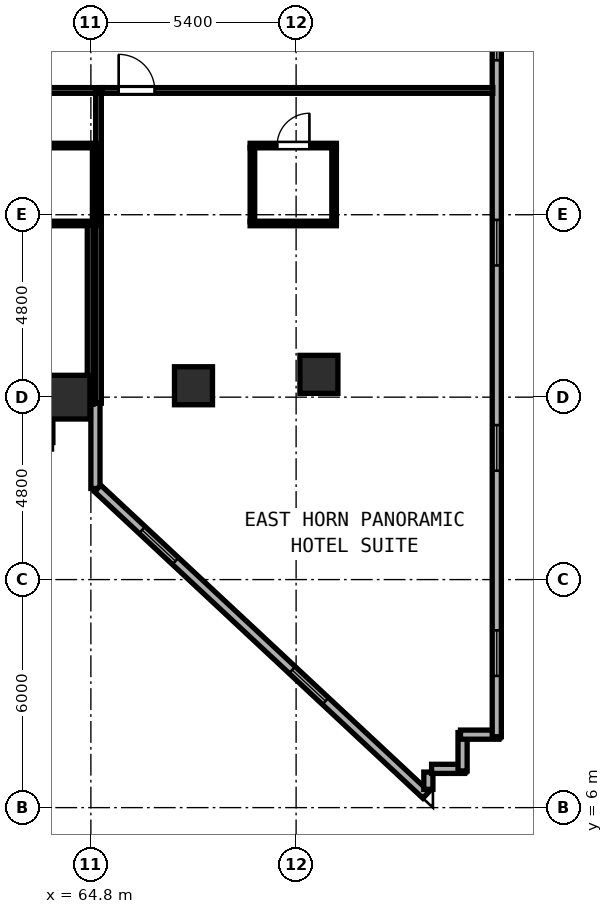
"""IFC4 building model, lengths in metres.
Left out: names, types, materials, properties, quantities, classifications, styles, units other than length and angle.
Written with IfcOpenShell. Run it as: python <this file> out.ifc"""

import sys

from ifc_helpers import new_model, si_unit, direction, frame, frame_2d, origin, origin_2d, place, context, subcontext, project, spatial, rectangle, hollow_rectangle, extrude, element, fill, save


model = new_model("IFC4")
c1 = context("Model", 3, precision=1e-05, world=origin(), true_north=direction((0.0, 1.0)))
c2 = subcontext(c1, "Body", "Model", "MODEL_VIEW")
j1 = project(units=[si_unit("LENGTHUNIT", "METRE"), si_unit("PLANEANGLEUNIT", "RADIAN")], contexts=[c1])
p1 = place(None, origin())
s1 = spatial("IfcSite", under=j1, at=p1, CompositionType="ELEMENT")
p2 = place(p1, origin())
s2 = spatial("IfcBuilding", under=s1, at=p2, CompositionType="ELEMENT")
p3 = place(p2, frame((0.0, 0.0, 70.4)))
s3 = spatial("IfcBuildingStorey", under=s2, at=p3, CompositionType="ELEMENT", Elevation=70.4)
p4 = place(p3, frame((64.2, 16.8, 0.0), z_axis=(0.0, 0.0, 1.0), x_axis=(1.0, 0.0, 0.0)))
e1 = element("IfcColumn", 1, at=p4, inside=s3, PredefinedType="COLUMN", context=c2, shape_type="SweptSolid", body=[
    extrude(hollow_rectangle(XDim=1.15, YDim=1.15, WallThickness=0.042, at=origin_2d()), origin(), (0.0, 0.0, 1.0), 3.8),
])
for number, where, z_axis, x_axis in (
    (2, (70.8, 17.4, 0.0), (0.0, 0.0, 1.0), (1.0, 0.0, 0.0)),
    (3, (67.5, 17.1, 0.0), (0.0, 0.0, 1.0), (1.0, 0.0, 0.0)),
):
    element("IfcColumn", number, at=place(p3, frame(where, z_axis=z_axis, x_axis=x_axis)), inside=s3, PredefinedType="COLUMN", context=c2, shape_type="SweptSolid", body=[
        extrude(hollow_rectangle(XDim=1.0, YDim=1.0, WallThickness=0.038, at=origin_2d()), origin(), (0.0, 0.0, 1.0), 3.8),
    ])
p5 = place(p3, frame((64.92, 16.64, 0.0), z_axis=(0.0, 0.0, 1.0), x_axis=(0.0, -1.0, 0.0)))
e4 = element("IfcWall", 4, at=p5, inside=s3, PredefinedType="SOLIDWALL", context=c2, shape_type="SweptSolid", body=[
    extrude(rectangle(XDim=2.243, YDim=0.24, at=frame_2d((1.121, 0.0))), origin(), (0.0, 0.0, 1.0), 3.6),
])
p6 = place(p3, frame((64.979, 14.397, 0.0), z_axis=(0.0, 0.0, 1.0), x_axis=(0.731053894258, -0.682319722484, 0.0)))
e5 = element("IfcWall", 5, at=p6, inside=s3, PredefinedType="SOLIDWALL", context=c2, shape_type="SweptSolid", body=[
    extrude(rectangle(XDim=11.818, YDim=0.24, at=frame_2d((5.909, 0.0))), origin(), (0.0, 0.0, 1.0), 3.6),
])
p7 = place(p6, frame((1.6, 0.0, 0.85)))
e6 = element("IfcOpeningElement", 6, at=p7, cuts=e5, PredefinedType="OPENING", context=c2, shape_type="SweptSolid", body=[
    extrude(rectangle(XDim=1.2, YDim=1.85, at=frame_2d((0.6, 0.925))), frame((0.0, 0.13, 0.0), z_axis=(0.0, -1.0, 0.0), x_axis=(1.0, 0.0, 0.0)), (0.0, 0.0, 1.0), 0.26),
])
p8 = place(p6, frame((7.0, 0.0, 0.85)))
e7 = element("IfcOpeningElement", 7, at=p8, cuts=e5, PredefinedType="OPENING", context=c2, shape_type="SweptSolid", body=[
    extrude(rectangle(XDim=1.2, YDim=1.85, at=frame_2d((0.6, 0.925))), frame((0.0, 0.13, 0.0), z_axis=(0.0, -1.0, 0.0), x_axis=(1.0, 0.0, 0.0)), (0.0, 0.0, 1.0), 0.26),
])
p9 = place(p3, frame((73.68, 6.481, 0.0), z_axis=(0.0, 0.0, 1.0), x_axis=(0.0, 1.0, 0.0)))
e8 = element("IfcWall", 8, at=p9, inside=s3, PredefinedType="SOLIDWALL", context=c2, shape_type="SweptSolid", body=[
    extrude(rectangle(XDim=0.454, YDim=0.24, at=frame_2d((0.227, 0.0))), origin(), (0.0, 0.0, 1.0), 3.6),
])
p10 = place(p3, frame((73.765, 7.02, 0.0), z_axis=(0.0, 0.0, 1.0), x_axis=(1.0, 0.0, 0.0)))
e9 = element("IfcWall", 9, at=p10, inside=s3, PredefinedType="SOLIDWALL", context=c2, shape_type="SweptSolid", body=[
    extrude(rectangle(XDim=0.87, YDim=0.24, at=frame_2d((0.435, 0.0))), origin(), (0.0, 0.0, 1.0), 3.6),
])
for number, where, z_axis, x_axis in (
    (10, (74.58, 6.965, 0.0), (0.0, 0.0, 1.0), (0.0, 1.0, 0.0)),
    (11, (74.525, 7.92, 0.0), (0.0, 0.0, 1.0), (1.0, 0.0, 0.0)),
):
    element("IfcWall", number, at=place(p3, frame(where, z_axis=z_axis, x_axis=x_axis)), inside=s3, PredefinedType="SOLIDWALL", context=c2, shape_type="SweptSolid", body=[
        extrude(rectangle(XDim=1.01, YDim=0.24, at=frame_2d((0.505, 0.0))), origin(), (0.0, 0.0, 1.0), 3.6),
    ])
p11 = place(p3, frame((75.48, 7.865, 0.0), z_axis=(0.0, 0.0, 1.0), x_axis=(0.0, 1.0, 0.0)))
e12 = element("IfcWall", 12, at=p11, inside=s3, PredefinedType="SOLIDWALL", context=c2, shape_type="SweptSolid", body=[
    extrude(rectangle(XDim=20.943, YDim=0.24, at=frame_2d((10.472, 0.0))), origin(), (0.0, 0.0, 1.0), 3.6),
])
p12 = place(p11, frame((1.6, 0.0, 0.85)))
e13 = element("IfcOpeningElement", 13, at=p12, cuts=e12, PredefinedType="OPENING", context=c2, shape_type="SweptSolid", body=[
    extrude(rectangle(XDim=1.2, YDim=1.85, at=frame_2d((0.6, 0.925))), frame((0.0, 0.13, 0.0), z_axis=(0.0, -1.0, 0.0), x_axis=(1.0, 0.0, 0.0)), (0.0, 0.0, 1.0), 0.26),
])
p13 = place(p11, frame((7.0, 0.0, 0.85)))
e14 = element("IfcOpeningElement", 14, at=p13, cuts=e12, PredefinedType="OPENING", context=c2, shape_type="SweptSolid", body=[
    extrude(rectangle(XDim=1.2, YDim=1.85, at=frame_2d((0.6, 0.925))), frame((0.0, 0.13, 0.0), z_axis=(0.0, -1.0, 0.0), x_axis=(1.0, 0.0, 0.0)), (0.0, 0.0, 1.0), 0.26),
])
p14 = place(p11, frame((12.4, 0.0, 0.85)))
e15 = element("IfcOpeningElement", 15, at=p14, cuts=e12, PredefinedType="OPENING", context=c2, shape_type="SweptSolid", body=[
    extrude(rectangle(XDim=1.2, YDim=1.85, at=frame_2d((0.6, 0.925))), frame((0.0, 0.13, 0.0), z_axis=(0.0, -1.0, 0.0), x_axis=(1.0, 0.0, 0.0)), (0.0, 0.0, 1.0), 0.26),
])
p15 = place(p11, frame((17.8, 0.0, 0.85)))
e16 = element("IfcOpeningElement", 16, at=p15, cuts=e12, PredefinedType="OPENING", context=c2, shape_type="SweptSolid", body=[
    extrude(rectangle(XDim=1.2, YDim=1.85, at=frame_2d((0.6, 0.925))), frame((0.0, 0.13, 0.0), z_axis=(0.0, -1.0, 0.0), x_axis=(1.0, 0.0, 0.0)), (0.0, 0.0, 1.0), 0.26),
])
p16 = place(p3, frame((59.242, 24.87, 0.0), z_axis=(0.0, 0.0, 1.0), x_axis=(1.0, 0.0, 0.0)))
e17 = element("IfcWall", 17, at=p16, inside=s3, PredefinedType="PARTITIONING", context=c2, shape_type="SweptSolid", body=[
    extrude(rectangle(XDim=5.858, YDim=0.15, at=frame_2d((2.929, 0.0))), origin(), (0.0, 0.0, 1.0), 3.185),
])
p17 = place(p16, frame((1.09, 0.0, 0.0), z_axis=(0.0, 0.0, 1.0), x_axis=(-1.0, 0.0, 0.0)))
e18 = element("IfcOpeningElement", 18, at=p17, cuts=e17, PredefinedType="OPENING", context=c2, shape_type="SweptSolid", body=[
    extrude(rectangle(XDim=0.95, YDim=2.18, at=frame_2d((0.475, 1.09))), frame((0.0, 0.085, 0.0), z_axis=(0.0, -1.0, 0.0), x_axis=(1.0, 0.0, 0.0)), (0.0, 0.0, 1.0), 0.17),
])
p18 = place(p3, frame((65.0, 16.642, 0.0), z_axis=(0.0, 0.0, 1.0), x_axis=(0.0, 1.0, 0.0)))
e19 = element("IfcWall", 19, at=p18, inside=s3, PredefinedType="PARTITIONING", context=c2, shape_type="SweptSolid", body=[
    extrude(rectangle(XDim=8.168, YDim=0.15, at=frame_2d((4.084, 0.0))), origin(), (0.0, 0.0, 1.0), 3.6),
])
for number, where, z_axis, x_axis in (
    (20, (62.69, 23.42, 0.0), (0.0, 0.0, 1.0), (1.0, 0.0, 0.0)),
    (21, (62.69, 21.37, 0.0), (0.0, 0.0, 1.0), (1.0, 0.0, 0.0)),
):
    element("IfcWall", number, at=place(p3, frame(where, z_axis=z_axis, x_axis=x_axis)), inside=s3, PredefinedType="PARTITIONING", context=c2, shape_type="SweptSolid", body=[
        extrude(rectangle(XDim=2.25, YDim=0.12, at=frame_2d((1.125, 0.0))), origin(), (0.0, 0.0, 1.0), 3.6),
    ])
p19 = place(p3, frame((64.9, 21.415, 0.0), z_axis=(0.0, 0.0, 1.0), x_axis=(0.0, 1.0, 0.0)))
e22 = element("IfcWall", 22, at=p19, inside=s3, PredefinedType="PARTITIONING", context=c2, shape_type="SweptSolid", body=[
    extrude(rectangle(XDim=1.96, YDim=0.12, at=frame_2d((0.98, 0.0))), origin(), (0.0, 0.0, 1.0), 3.6),
])
p20 = place(p3, frame((65.102, 24.87, 0.0), z_axis=(0.0, 0.0, 1.0), x_axis=(1.0, 0.0, 0.0)))
e23 = element("IfcWall", 23, at=p20, inside=s3, PredefinedType="PARTITIONING", context=c2, shape_type="SweptSolid", body=[
    extrude(rectangle(XDim=10.273, YDim=0.15, at=frame_2d((5.136, 0.0))), origin(), (0.0, 0.0, 1.0), 3.6),
])
p21 = place(p20, frame((1.379, 0.0, 0.0), z_axis=(0.0, 0.0, 1.0), x_axis=(-1.0, 0.0, 0.0)))
e24 = element("IfcOpeningElement", 24, at=p21, cuts=e23, PredefinedType="OPENING", context=c2, shape_type="SweptSolid", body=[
    extrude(rectangle(XDim=0.95, YDim=2.18, at=frame_2d((0.475, 1.09))), frame((0.0, 0.085, 0.0), z_axis=(0.0, -1.0, 0.0), x_axis=(1.0, 0.0, 0.0)), (0.0, 0.0, 1.0), 0.17),
])
p22 = place(p3, frame((64.78, 16.612, 0.0), z_axis=(0.0, 0.0, 1.0), x_axis=(0.0, 1.0, 0.0)))
e25 = element("IfcWall", 25, at=p22, inside=s3, PredefinedType="PARTITIONING", context=c2, shape_type="SweptSolid", body=[
    extrude(rectangle(XDim=4.713, YDim=0.15, at=frame_2d((2.356, 0.0))), origin(), (0.0, 0.0, 1.0), 3.6),
])
p23 = place(p3, frame((68.99, 23.42, 0.0), z_axis=(0.0, 0.0, 1.0), x_axis=(1.0, 0.0, 0.0)))
e26 = element("IfcWall", 26, at=p23, inside=s3, PredefinedType="PARTITIONING", context=c2, shape_type="SweptSolid", body=[
    extrude(rectangle(XDim=2.27, YDim=0.12, at=frame_2d((1.135, 0.0))), origin(), (0.0, 0.0, 1.0), 3.6),
])
p24 = place(p23, frame((1.56, 0.0, 0.0), z_axis=(0.0, 0.0, 1.0), x_axis=(-1.0, 0.0, 0.0)))
e27 = element("IfcOpeningElement", 27, at=p24, cuts=e26, PredefinedType="OPENING", context=c2, shape_type="SweptSolid", body=[
    extrude(rectangle(XDim=0.85, YDim=2.1, at=frame_2d((0.425, 1.05))), frame((0.0, 0.07, 0.0), z_axis=(0.0, -1.0, 0.0), x_axis=(1.0, 0.0, 0.0)), (0.0, 0.0, 1.0), 0.14),
])
p25 = place(p3, frame((68.99, 21.37, 0.0), z_axis=(0.0, 0.0, 1.0), x_axis=(1.0, 0.0, 0.0)))
e28 = element("IfcWall", 28, at=p25, inside=s3, PredefinedType="PARTITIONING", context=c2, shape_type="SweptSolid", body=[
    extrude(rectangle(XDim=2.27, YDim=0.12, at=frame_2d((1.135, 0.0))), origin(), (0.0, 0.0, 1.0), 3.6),
])
for number, where, z_axis, x_axis in (
    (29, (69.05, 21.415, 0.0), (0.0, 0.0, 1.0), (0.0, 1.0, 0.0)),
    (30, (71.2, 21.415, 0.0), (0.0, 0.0, 1.0), (0.0, 1.0, 0.0)),
):
    element("IfcWall", number, at=place(p3, frame(where, z_axis=z_axis, x_axis=x_axis)), inside=s3, PredefinedType="PARTITIONING", context=c2, shape_type="SweptSolid", body=[
        extrude(rectangle(XDim=1.96, YDim=0.12, at=frame_2d((0.98, 0.0))), origin(), (0.0, 0.0, 1.0), 3.6),
    ])
p26 = place(p7, origin())
e31 = element("IfcWindow", 31, at=p26, inside=s3, PartitioningType="SINGLE_PANEL", PredefinedType="WINDOW", context=c2, shape_type="SweptSolid", body=[
    extrude(rectangle(XDim=1.2, YDim=1.85, at=frame_2d((0.6, 0.925))), frame((0.0, 0.03, 0.0), z_axis=(0.0, -1.0, 0.0), x_axis=(1.0, 0.0, 0.0)), (0.0, 0.0, 1.0), 0.06),
])
fill(e6, e31)
p27 = place(p8, origin())
e32 = element("IfcWindow", 32, at=p27, inside=s3, PartitioningType="SINGLE_PANEL", PredefinedType="WINDOW", context=c2, shape_type="SweptSolid", body=[
    extrude(rectangle(XDim=1.2, YDim=1.85, at=frame_2d((0.6, 0.925))), frame((0.0, 0.03, 0.0), z_axis=(0.0, -1.0, 0.0), x_axis=(1.0, 0.0, 0.0)), (0.0, 0.0, 1.0), 0.06),
])
fill(e7, e32)
p28 = place(p12, origin())
e33 = element("IfcWindow", 33, at=p28, inside=s3, PartitioningType="SINGLE_PANEL", PredefinedType="WINDOW", context=c2, shape_type="SweptSolid", body=[
    extrude(rectangle(XDim=1.2, YDim=1.85, at=frame_2d((0.6, 0.925))), frame((0.0, 0.03, 0.0), z_axis=(0.0, -1.0, 0.0), x_axis=(1.0, 0.0, 0.0)), (0.0, 0.0, 1.0), 0.06),
])
fill(e13, e33)
p29 = place(p13, origin())
e34 = element("IfcWindow", 34, at=p29, inside=s3, PartitioningType="SINGLE_PANEL", PredefinedType="WINDOW", context=c2, shape_type="SweptSolid", body=[
    extrude(rectangle(XDim=1.2, YDim=1.85, at=frame_2d((0.6, 0.925))), frame((0.0, 0.03, 0.0), z_axis=(0.0, -1.0, 0.0), x_axis=(1.0, 0.0, 0.0)), (0.0, 0.0, 1.0), 0.06),
])
fill(e14, e34)
p30 = place(p14, origin())
e35 = element("IfcWindow", 35, at=p30, inside=s3, PartitioningType="SINGLE_PANEL", PredefinedType="WINDOW", context=c2, shape_type="SweptSolid", body=[
    extrude(rectangle(XDim=1.2, YDim=1.85, at=frame_2d((0.6, 0.925))), frame((0.0, 0.03, 0.0), z_axis=(0.0, -1.0, 0.0), x_axis=(1.0, 0.0, 0.0)), (0.0, 0.0, 1.0), 0.06),
])
fill(e15, e35)
p31 = place(p15, origin())
e36 = element("IfcWindow", 36, at=p31, inside=s3, PartitioningType="SINGLE_PANEL", PredefinedType="WINDOW", context=c2, shape_type="SweptSolid", body=[
    extrude(rectangle(XDim=1.2, YDim=1.85, at=frame_2d((0.6, 0.925))), frame((0.0, 0.03, 0.0), z_axis=(0.0, -1.0, 0.0), x_axis=(1.0, 0.0, 0.0)), (0.0, 0.0, 1.0), 0.06),
])
fill(e16, e36)
p32 = place(p21, origin())
e37 = element("IfcDoor", 37, at=p32, inside=s3, OperationType="SINGLE_SWING_RIGHT", PredefinedType="DOOR", context=c2, shape_type="SweptSolid", body=[
    extrude(rectangle(XDim=0.95, YDim=2.18, at=frame_2d((0.475, 1.09))), frame((0.0, 0.025, 0.0), z_axis=(0.0, -1.0, 0.0), x_axis=(1.0, 0.0, 0.0)), (0.0, 0.0, 1.0), 0.05),
])
fill(e24, e37)
p33 = place(p24, origin())
e38 = element("IfcDoor", 38, at=p33, inside=s3, OperationType="SINGLE_SWING_LEFT", PredefinedType="DOOR", context=c2, shape_type="SweptSolid", body=[
    extrude(rectangle(XDim=0.85, YDim=2.1, at=frame_2d((0.425, 1.05))), frame((0.0, 0.025, 0.0), z_axis=(0.0, -1.0, 0.0), x_axis=(1.0, 0.0, 0.0)), (0.0, 0.0, 1.0), 0.05),
])
fill(e27, e38)
save(model, sys.argv[1])
